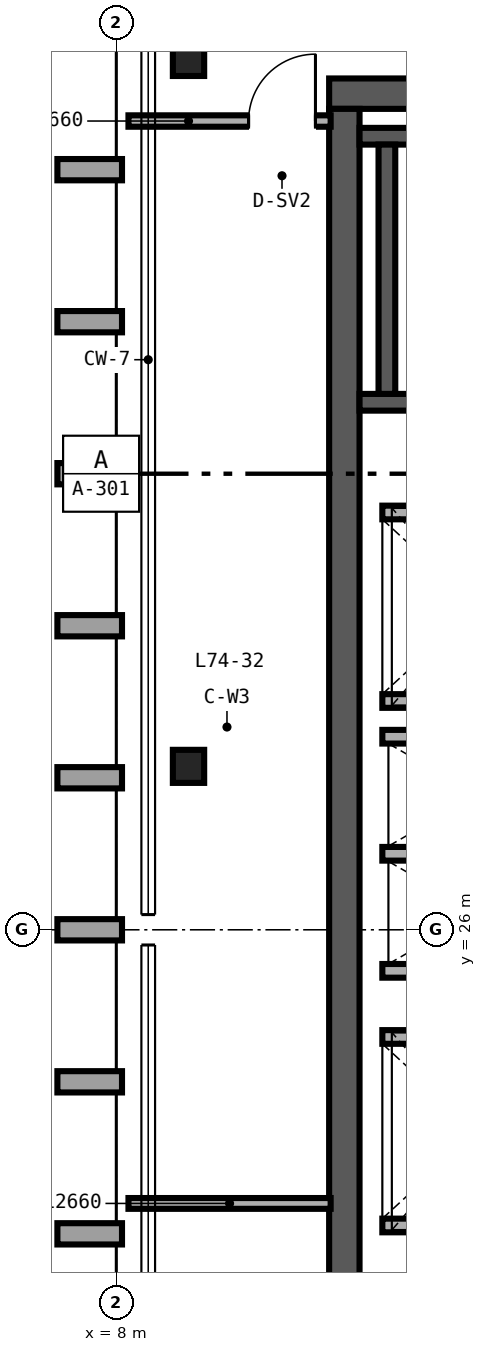
"""IFC4 building model, lengths in metres.
Left out: names, types, materials, properties, quantities, classifications, styles, units other than length and angle.
Written with IfcOpenShell. Run it as: python <this file> out.ifc"""

import sys

from ifc_helpers import new_model, si_unit, direction, frame, frame_2d, origin, origin_2d, place, context, subcontext, project, spatial, rectangle, i_section, extrude, source, transform, mapped, element, fill, save


model = new_model("IFC4")
c1 = context("Model", 3, precision=1e-05, world=origin(), true_north=direction((0.0, 1.0)))
c2 = subcontext(c1, "Body", "Model", "MODEL_VIEW")
j1 = project(units=[si_unit("LENGTHUNIT", "METRE"), si_unit("PLANEANGLEUNIT", "RADIAN")], contexts=[c1])
p1 = place(None, origin())
s1 = spatial("IfcSite", under=j1, at=p1, CompositionType="ELEMENT")
p2 = place(p1, origin())
s2 = spatial("IfcBuilding", under=s1, at=p2, CompositionType="ELEMENT")
p3 = place(p2, frame((0.0, 0.0, 290.4)))
s3 = spatial("IfcBuildingStorey", under=s2, at=p3, CompositionType="ELEMENT", Elevation=290.4)
p4 = place(p3, frame((10.8, 37.0, 0.0), z_axis=(0.0, 0.0, 1.0), x_axis=(1.0, 0.0, 0.0)))
e1 = element("IfcWall", 1, at=p4, inside=s3, PredefinedType="SHEAR", context=c2, shape_type="SweptSolid", body=[
    extrude(rectangle(XDim=12.4, YDim=0.4, at=frame_2d((6.2, 0.0))), origin(), (0.0, 0.0, 1.0), 3.38),
])
p5 = place(p4, frame((10.3, 0.0, 0.0)))
e2 = element("IfcOpeningElement", 2, at=p5, cuts=e1, PredefinedType="OPENING", context=c2, shape_type="SweptSolid", body=[
    extrude(rectangle(XDim=1.0, YDim=2.15, at=frame_2d((0.5, 1.075))), frame((0.0, 0.21, 0.0), z_axis=(0.0, -1.0, 0.0), x_axis=(1.0, 0.0, 0.0)), (0.0, 0.0, 1.0), 0.42),
])
p6 = place(p3, frame((11.0, 15.2, 0.0), z_axis=(0.0, 0.0, 1.0), x_axis=(0.0, 1.0, 0.0)))
e3 = element("IfcWall", 3, at=p6, inside=s3, PredefinedType="SHEAR", context=c2, shape_type="SweptSolid", body=[
    extrude(rectangle(XDim=21.6, YDim=0.4, at=frame_2d((10.8, 0.0))), origin(), (0.0, 0.0, 1.0), 3.38),
])
p7 = place(p3, frame((11.2, 32.94, 0.0), z_axis=(0.0, 0.0, 1.0), x_axis=(1.0, 0.0, 0.0)))
e4 = element("IfcWall", 4, at=p7, inside=s3, PredefinedType="SHEAR", context=c2, shape_type="SweptSolid", body=[
    extrude(rectangle(XDim=8.11, YDim=0.22, at=frame_2d((4.055, 0.0))), origin(), (0.0, 0.0, 1.0), 3.4),
])
p8 = place(p7, frame((0.72, 0.0, 0.0)))
e5 = element("IfcOpeningElement", 5, at=p8, cuts=e4, PredefinedType="OPENING", context=c2, shape_type="SweptSolid", body=[
    extrude(rectangle(XDim=1.05, YDim=2.15, at=frame_2d((0.525, 1.075))), frame((0.0, 0.12, 0.0), z_axis=(0.0, -1.0, 0.0), x_axis=(1.0, 0.0, 0.0)), (0.0, 0.0, 1.0), 0.24),
])
p9 = place(p3, frame((11.2, 36.44, 0.0), z_axis=(0.0, 0.0, 1.0), x_axis=(1.0, 0.0, 0.0)))
e6 = element("IfcWall", 6, at=p9, inside=s3, PredefinedType="SHEAR", context=c2, shape_type="SweptSolid", body=[
    extrude(rectangle(XDim=8.11, YDim=0.22, at=frame_2d((4.055, 0.0))), origin(), (0.0, 0.0, 1.0), 3.4),
])
p10 = place(p3, frame((11.56, 33.05, 0.0), z_axis=(0.0, 0.0, 1.0), x_axis=(0.0, 1.0, 0.0)))
e7 = element("IfcWall", 7, at=p10, inside=s3, PredefinedType="SHEAR", context=c2, shape_type="SweptSolid", body=[
    extrude(rectangle(XDim=3.28, YDim=0.22, at=frame_2d((1.64, 0.0))), origin(), (0.0, 0.0, 1.0), 3.4),
])
m1 = source(origin(), c2, "Body", "SweptSolid", [
    extrude(i_section(OverallWidth=0.412, OverallDepth=0.435, WebThickness=0.036, FlangeThickness=0.057, FilletRadius=0.025, at=origin_2d()), origin(), (0.0, 0.0, 1.0), 3.38),
])
for number, where, z_axis, x_axis in (
    (8, (8.95, 28.15, 0.0), (0.0, 0.0, 1.0), (1.0, 0.0, 0.0)),
    (9, (8.95, 37.45, 0.0), (0.0, 0.0, 1.0), (1.0, 0.0, 0.0)),
):
    element("IfcColumn", number, at=place(p3, frame(where, z_axis=z_axis, x_axis=x_axis)), inside=s3, PredefinedType="COLUMN", context=c2, shape_type="MappedRepresentation", body=[
        mapped(m1, transform((0.0, 0.0, 0.0), scale=1.0)),
    ])
for number, where, z_axis, x_axis in (
    (10, (11.5, 22.11, 0.0), (0.0, 0.0, 1.0), (1.0, 0.0, 0.0)),
    (11, (11.5, 24.59, 0.0), (0.0, 0.0, 1.0), (1.0, 0.0, 0.0)),
    (12, (11.5, 29.01, 0.0), (0.0, 0.0, 1.0), (1.0, 0.0, 0.0)),
    (13, (11.5, 31.49, 0.0), (0.0, 0.0, 1.0), (1.0, 0.0, 0.0)),
):
    element("IfcWall", number, at=place(p3, frame(where, z_axis=z_axis, x_axis=x_axis)), inside=s3, PredefinedType="SOLIDWALL", context=c2, shape_type="SweptSolid", body=[
        extrude(rectangle(XDim=2.5, YDim=0.18, at=frame_2d((1.25, 0.0))), origin(), (0.0, 0.0, 1.0), 3.38),
    ])
for number, where, z_axis, x_axis in (
    (14, (11.5, 25.46, 0.0), (0.0, 0.0, 1.0), (1.0, 0.0, 0.0)),
    (15, (11.5, 27.0, 0.0), (0.0, 0.0, 1.0), (1.0, 0.0, 0.0)),
    (16, (11.5, 28.54, 0.0), (0.0, 0.0, 1.0), (1.0, 0.0, 0.0)),
):
    element("IfcWall", number, at=place(p3, frame(where, z_axis=z_axis, x_axis=x_axis)), inside=s3, PredefinedType="SOLIDWALL", context=c2, shape_type="SweptSolid", body=[
        extrude(rectangle(XDim=2.51, YDim=0.18, at=frame_2d((1.255, 0.0))), origin(), (0.0, 0.0, 1.0), 3.38),
    ])
p11 = place(p3, frame((8.16, 36.64, 0.0), z_axis=(0.0, 0.0, 1.0), x_axis=(1.0, 0.0, 0.0)))
e17 = element("IfcWall", 17, at=p11, inside=s3, PredefinedType="PARTITIONING", context=c2, shape_type="SweptSolid", body=[
    extrude(rectangle(XDim=2.66, YDim=0.15, at=frame_2d((1.33, 0.0))), origin(), (0.0, 0.0, 1.0), 2.763),
])
p12 = place(p11, frame((1.58, 0.0, 0.0)))
e18 = element("IfcOpeningElement", 18, at=p12, cuts=e17, PredefinedType="OPENING", context=c2, shape_type="SweptSolid", body=[
    extrude(rectangle(XDim=0.88, YDim=2.15, at=frame_2d((0.44, 1.075))), frame((0.0, 0.085, 0.0), z_axis=(0.0, -1.0, 0.0), x_axis=(1.0, 0.0, 0.0)), (0.0, 0.0, 1.0), 0.17),
])
p13 = place(p3, frame((8.16, 22.4, 0.0), z_axis=(0.0, 0.0, 1.0), x_axis=(1.0, 0.0, 0.0)))
e19 = element("IfcWall", 19, at=p13, inside=s3, PredefinedType="PARTITIONING", context=c2, shape_type="SweptSolid", body=[
    extrude(rectangle(XDim=2.66, YDim=0.142, at=frame_2d((1.33, 0.0))), origin(), (0.0, 0.0, 1.0), 2.601),
])
m2 = source(origin(), c2, "Body", "SweptSolid", [
    extrude(rectangle(XDim=0.88, YDim=2.15, at=frame_2d((0.44, 1.075))), frame((0.0, 0.025, 0.0), z_axis=(0.0, -1.0, 0.0), x_axis=(1.0, 0.0, 0.0)), (0.0, 0.0, 1.0), 0.05),
])
p14 = place(p12, origin())
e20 = element("IfcDoor", 20, at=p14, inside=s3, OperationType="SINGLE_SWING_RIGHT", PredefinedType="DOOR", context=c2, shape_type="MappedRepresentation", body=[
    mapped(m2, transform((0.0, 0.0, 0.0), scale=1.0)),
])
fill(e18, e20)
save(model, sys.argv[1])
